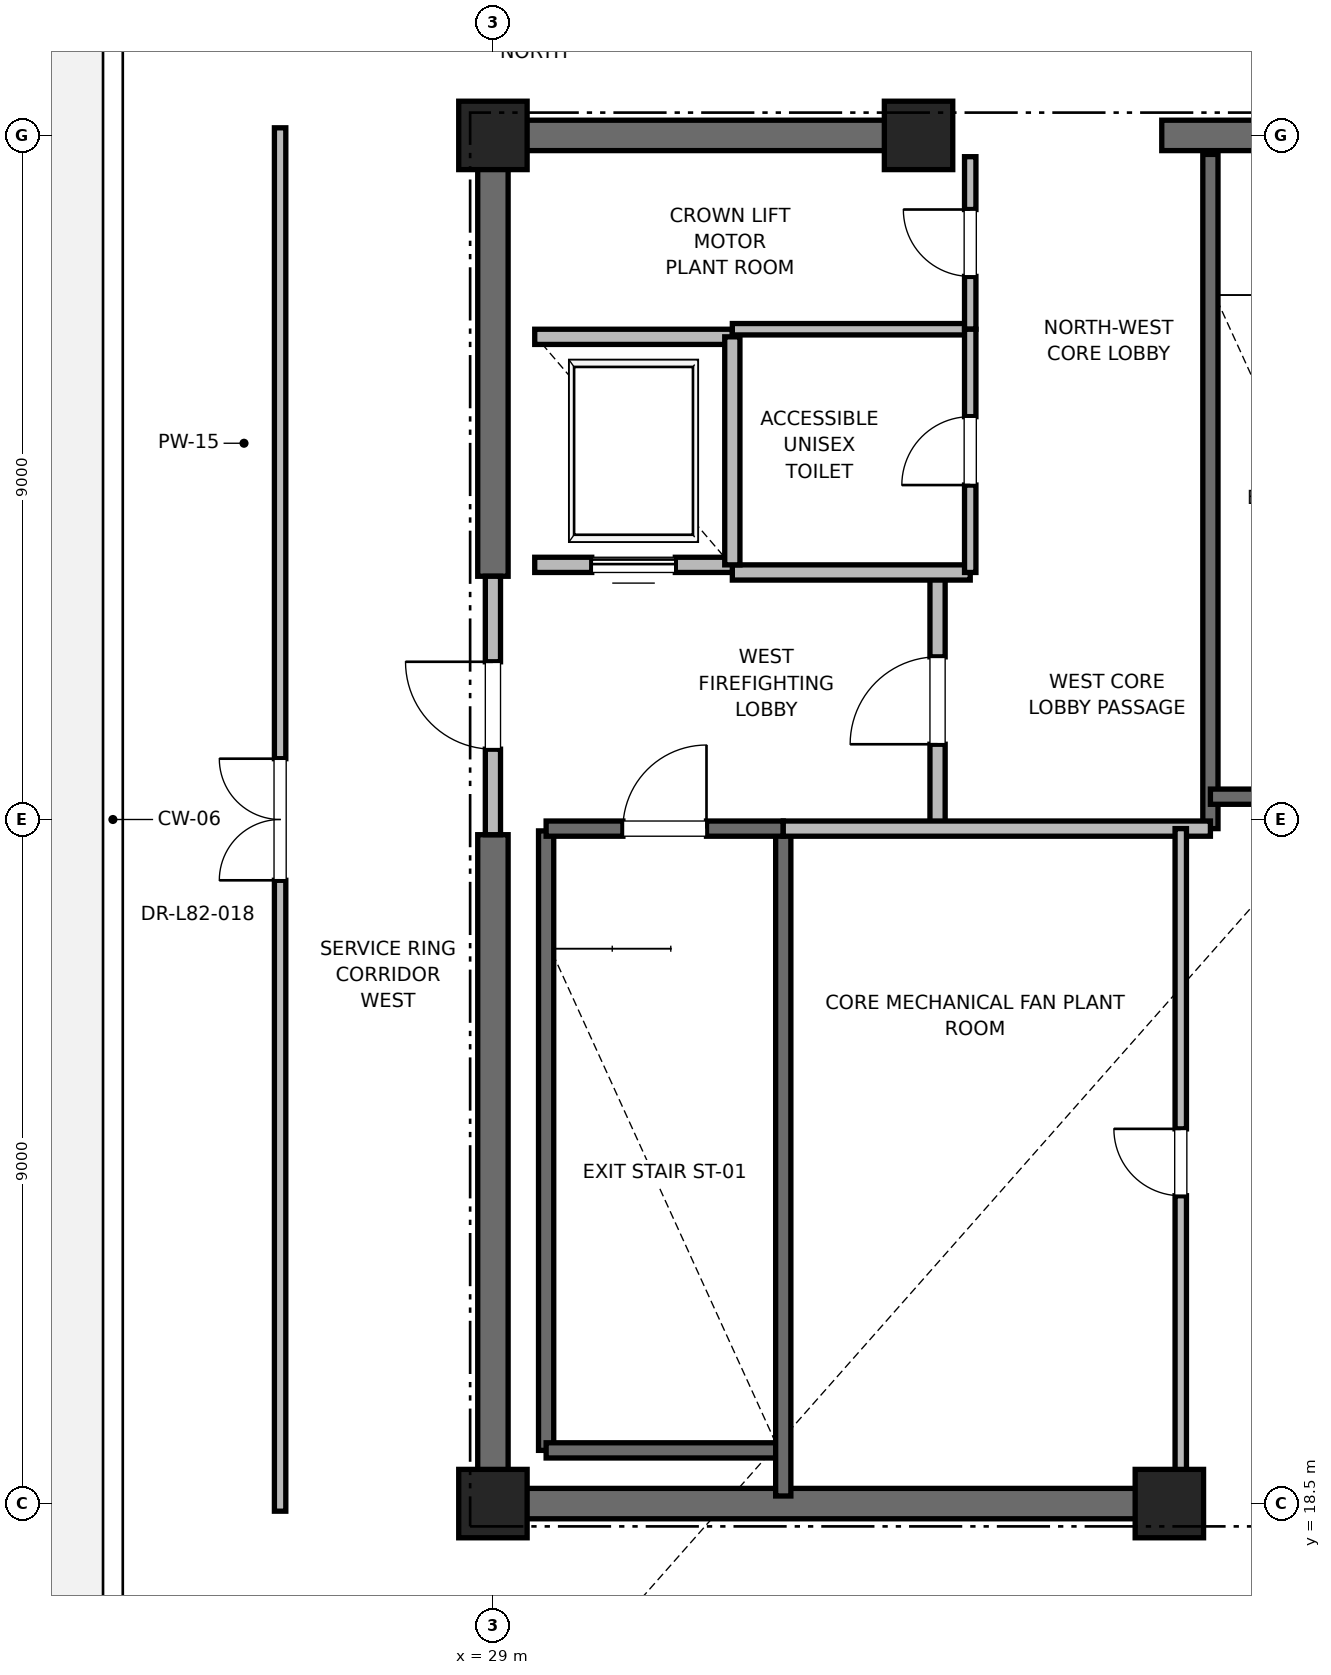
"""IFC4 building model, lengths in metres.
Left out: names, types, materials, properties, quantities, classifications, styles, units other than length and angle.
Written with IfcOpenShell. Run it as: python <this file> out.ifc"""

import sys

from ifc_helpers import new_model, si_unit, direction, frame, frame_2d, origin, origin_2d, place, context, subcontext, project, spatial, rectangle, extrude, element, fill, save


model = new_model("IFC4")
c1 = context("Model", 3, precision=1e-05, world=origin(), true_north=direction((0.0, 1.0)))
c2 = subcontext(c1, "Body", "Model", "MODEL_VIEW")
j1 = project(units=[si_unit("LENGTHUNIT", "METRE"), si_unit("PLANEANGLEUNIT", "RADIAN")], contexts=[c1])
p1 = place(None, origin())
s1 = spatial("IfcSite", under=j1, at=p1, CompositionType="ELEMENT")
p2 = place(p1, origin())
s2 = spatial("IfcBuilding", under=s1, at=p2, CompositionType="ELEMENT")
p3 = place(p2, frame((0.0, 0.0, 354.3)))
s3 = spatial("IfcBuildingStorey", under=s2, at=p3, CompositionType="ELEMENT", Elevation=354.3)
for number, where, z_axis, x_axis in (
    (1, (29.0, 18.5, 0.0), (0.0, 0.0, 1.0), (1.0, 0.0, 0.0)),
    (2, (29.0, 36.5, 0.0), (0.0, 0.0, 1.0), (1.0, 0.0, 0.0)),
    (3, (37.9, 18.5, 0.0), (0.0, 0.0, 1.0), (1.0, 0.0, 0.0)),
    (4, (34.6, 36.5, 0.0), (0.0, 0.0, 1.0), (1.0, 0.0, 0.0)),
):
    element("IfcColumn", number, at=place(p3, frame(where, z_axis=z_axis, x_axis=x_axis)), inside=s3, PredefinedType="PILASTER", context=c2, shape_type="SweptSolid", body=[
        extrude(rectangle(XDim=0.9, YDim=0.9, at=origin_2d()), origin(), (0.0, 0.0, 1.0), 5.5),
    ])
p4 = place(p3, frame((29.0, 18.5, 0.0), z_axis=(0.0, 0.0, 1.0), x_axis=(1.0, 0.0, 0.0)))
e5 = element("IfcWall", 5, at=p4, inside=s3, PredefinedType="SHEAR", context=c2, shape_type="SweptSolid", body=[
    extrude(rectangle(XDim=9.2, YDim=0.4, at=frame_2d((4.6, 0.0))), origin(), (0.0, 0.0, 1.0), 5.24),
])
p5 = place(p3, frame((29.0, 36.5, 0.0), z_axis=(0.0, 0.0, 1.0), x_axis=(1.0, 0.0, 0.0)))
e6 = element("IfcWall", 6, at=p5, inside=s3, PredefinedType="SHEAR", context=c2, shape_type="SweptSolid", body=[
    extrude(rectangle(XDim=5.8, YDim=0.4, at=frame_2d((2.9, 0.0))), origin(), (0.0, 0.0, 1.0), 5.24),
])
p6 = place(p3, frame((37.8, 36.5, 0.0), z_axis=(0.0, 0.0, 1.0), x_axis=(1.0, 0.0, 0.0)))
e7 = element("IfcWall", 7, at=p6, inside=s3, PredefinedType="SHEAR", context=c2, shape_type="SweptSolid", body=[
    extrude(rectangle(XDim=4.4, YDim=0.4, at=frame_2d((2.2, 0.0))), origin(), (0.0, 0.0, 1.0), 5.24),
])
p7 = place(p6, frame((1.65, 0.0, 0.0)))
e8 = element("IfcOpeningElement", 8, at=p7, cuts=e7, PredefinedType="OPENING", context=c2, shape_type="SweptSolid", body=[
    extrude(rectangle(XDim=1.1, YDim=2.15, at=frame_2d((0.55, 1.075))), frame((0.0, 0.2, 0.0), z_axis=(0.0, -1.0, 0.0), x_axis=(1.0, 0.0, 0.0)), (0.0, 0.0, 1.0), 0.4),
])
p8 = place(p3, frame((29.0, 18.5, 0.0), z_axis=(0.0, 0.0, 1.0), x_axis=(0.0, 1.0, 0.0)))
e9 = element("IfcWall", 9, at=p8, inside=s3, PredefinedType="SHEAR", context=c2, shape_type="SweptSolid", body=[
    extrude(rectangle(XDim=8.8, YDim=0.4, at=frame_2d((4.4, 0.0))), origin(), (0.0, 0.0, 1.0), 5.24),
])
p9 = place(p3, frame((29.0, 30.7, 0.0), z_axis=(0.0, 0.0, 1.0), x_axis=(0.0, 1.0, 0.0)))
e10 = element("IfcWall", 10, at=p9, inside=s3, PredefinedType="SHEAR", context=c2, shape_type="SweptSolid", body=[
    extrude(rectangle(XDim=5.8, YDim=0.4, at=frame_2d((2.9, 0.0))), origin(), (0.0, 0.0, 1.0), 5.24),
])
p10 = place(p3, frame((29.7, 19.2, 0.0), z_axis=(0.0, 0.0, 1.0), x_axis=(0.0, 1.0, 0.0)))
e11 = element("IfcWall", 11, at=p10, inside=s3, PredefinedType="SOLIDWALL", context=c2, shape_type="SweptSolid", body=[
    extrude(rectangle(XDim=8.15, YDim=0.2, at=frame_2d((4.075, 0.0))), origin(), (0.0, 0.0, 1.0), 5.24),
])
p11 = place(p3, frame((29.7, 19.2, 0.0), z_axis=(0.0, 0.0, 1.0), x_axis=(1.0, 0.0, 0.0)))
e12 = element("IfcWall", 12, at=p11, inside=s3, PredefinedType="SOLIDWALL", context=c2, shape_type="SweptSolid", body=[
    extrude(rectangle(XDim=3.12, YDim=0.2, at=frame_2d((1.56, 0.0))), origin(), (0.0, 0.0, 1.0), 5.24),
])
p12 = place(p3, frame((32.82, 18.6, 0.0), z_axis=(0.0, 0.0, 1.0), x_axis=(0.0, 1.0, 0.0)))
e13 = element("IfcWall", 13, at=p12, inside=s3, PredefinedType="SOLIDWALL", context=c2, shape_type="SweptSolid", body=[
    extrude(rectangle(XDim=8.78, YDim=0.2, at=frame_2d((4.39, 0.0))), origin(), (0.0, 0.0, 1.0), 5.24),
])
p13 = place(p3, frame((29.7, 27.38, 0.0), z_axis=(0.0, 0.0, 1.0), x_axis=(1.0, 0.0, 0.0)))
e14 = element("IfcWall", 14, at=p13, inside=s3, PredefinedType="SOLIDWALL", context=c2, shape_type="SweptSolid", body=[
    extrude(rectangle(XDim=3.12, YDim=0.2, at=frame_2d((1.56, 0.0))), origin(), (0.0, 0.0, 1.0), 5.24),
])
p14 = place(p13, frame((1.01, 0.0, 0.0)))
e15 = element("IfcOpeningElement", 15, at=p14, cuts=e14, PredefinedType="OPENING", context=c2, shape_type="SweptSolid", body=[
    extrude(rectangle(XDim=1.1, YDim=2.15, at=frame_2d((0.55, 1.075))), frame((0.0, 0.1, 0.0), z_axis=(0.0, -1.0, 0.0), x_axis=(1.0, 0.0, 0.0)), (0.0, 0.0, 1.0), 0.2),
])
p15 = place(p3, frame((38.44, 27.38, 0.0), z_axis=(0.0, 0.0, 1.0), x_axis=(0.0, 1.0, 0.0)))
e16 = element("IfcWall", 16, at=p15, inside=s3, PredefinedType="SOLIDWALL", context=c2, shape_type="SweptSolid", body=[
    extrude(rectangle(XDim=8.87, YDim=0.2, at=frame_2d((4.435, 0.0))), origin(), (0.0, 0.0, 1.0), 5.24),
])
p16 = place(p3, frame((38.44, 27.8, 0.0), z_axis=(0.0, 0.0, 1.0), x_axis=(1.0, 0.0, 0.0)))
e17 = element("IfcWall", 17, at=p16, inside=s3, PredefinedType="SOLIDWALL", context=c2, shape_type="SweptSolid", body=[
    extrude(rectangle(XDim=3.32, YDim=0.2, at=frame_2d((1.66, 0.0))), origin(), (0.0, 0.0, 1.0), 5.24),
])
p17 = place(p3, frame((34.85, 27.38, 0.0), z_axis=(0.0, 0.0, 1.0), x_axis=(0.0, 1.0, 0.0)))
e18 = element("IfcWall", 18, at=p17, inside=s3, PredefinedType="PARTITIONING", context=c2, shape_type="SweptSolid", body=[
    extrude(rectangle(XDim=3.37, YDim=0.2, at=frame_2d((1.685, 0.0))), origin(), (0.0, 0.0, 1.0), 5.24),
])
p18 = place(p17, frame((1.11, 0.0, 0.0)))
e19 = element("IfcOpeningElement", 19, at=p18, cuts=e18, PredefinedType="OPENING", context=c2, shape_type="SweptSolid", body=[
    extrude(rectangle(XDim=1.15, YDim=2.2, at=frame_2d((0.575, 1.1))), frame((0.0, 0.1, 0.0), z_axis=(0.0, -1.0, 0.0), x_axis=(1.0, 0.0, 0.0)), (0.0, 0.0, 1.0), 0.2),
])
p19 = place(p3, frame((29.0, 27.3, 0.0), z_axis=(0.0, 0.0, 1.0), x_axis=(0.0, 1.0, 0.0)))
e20 = element("IfcWall", 20, at=p19, inside=s3, PredefinedType="PARTITIONING", context=c2, shape_type="SweptSolid", body=[
    extrude(rectangle(XDim=3.4, YDim=0.2, at=frame_2d((1.7, 0.0))), origin(), (0.0, 0.0, 1.0), 4.32),
])
p20 = place(p19, frame((1.125, 0.0, 0.0)))
e21 = element("IfcOpeningElement", 21, at=p20, cuts=e20, PredefinedType="OPENING", context=c2, shape_type="SweptSolid", body=[
    extrude(rectangle(XDim=1.15, YDim=2.2, at=frame_2d((0.575, 1.1))), frame((0.0, 0.1, 0.0), z_axis=(0.0, -1.0, 0.0), x_axis=(1.0, 0.0, 0.0)), (0.0, 0.0, 1.0), 0.2),
])
p21 = place(p3, frame((32.82, 27.38, 0.0), z_axis=(0.0, 0.0, 1.0), x_axis=(1.0, 0.0, 0.0)))
e22 = element("IfcWall", 22, at=p21, inside=s3, PredefinedType="PARTITIONING", context=c2, shape_type="SweptSolid", body=[
    extrude(rectangle(XDim=5.62, YDim=0.2, at=frame_2d((2.81, 0.0))), origin(), (0.0, 0.0, 1.0), 5.24),
])
p22 = place(p3, frame((32.15, 30.75, 0.0), z_axis=(0.0, 0.0, 1.0), x_axis=(1.0, 0.0, 0.0)))
e23 = element("IfcWall", 23, at=p22, inside=s3, PredefinedType="PARTITIONING", context=c2, shape_type="SweptSolid", body=[
    extrude(rectangle(XDim=3.13, YDim=0.2, at=frame_2d((1.565, 0.0))), origin(), (0.0, 0.0, 1.0), 5.24),
])
p23 = place(p3, frame((29.55, 30.85, 0.0), z_axis=(0.0, 0.0, 1.0), x_axis=(1.0, 0.0, 0.0)))
e24 = element("IfcWall", 24, at=p23, inside=s3, PredefinedType="SOLIDWALL", context=c2, shape_type="SweptSolid", body=[
    extrude(rectangle(XDim=2.6, YDim=0.2, at=frame_2d((1.3, 0.0))), origin(), (0.0, 0.0, 1.0), 4.32),
])
p24 = place(p23, frame((0.75, 0.0, 0.0)))
e25 = element("IfcOpeningElement", 25, at=p24, cuts=e24, PredefinedType="OPENING", context=c2, shape_type="SweptSolid", body=[
    extrude(rectangle(XDim=1.1, YDim=2.2, at=frame_2d((0.55, 1.1))), frame((0.0, 0.1, 0.0), z_axis=(0.0, -1.0, 0.0), x_axis=(1.0, 0.0, 0.0)), (0.0, 0.0, 1.0), 0.2),
])
p25 = place(p3, frame((32.15, 33.85, 0.0), z_axis=(0.0, 0.0, 1.0), x_axis=(-1.0, 0.0, 0.0)))
e26 = element("IfcWall", 26, at=p25, inside=s3, PredefinedType="SOLIDWALL", context=c2, shape_type="SweptSolid", body=[
    extrude(rectangle(XDim=2.6, YDim=0.2, at=frame_2d((1.3, 0.0))), origin(), (0.0, 0.0, 1.0), 5.24),
])
p26 = place(p3, frame((32.15, 30.85, 0.0), z_axis=(0.0, 0.0, 1.0), x_axis=(0.0, 1.0, 0.0)))
e27 = element("IfcWall", 27, at=p26, inside=s3, PredefinedType="SOLIDWALL", context=c2, shape_type="SweptSolid", body=[
    extrude(rectangle(XDim=3.0, YDim=0.2, at=frame_2d((1.5, 0.0))), origin(), (0.0, 0.0, 1.0), 5.24),
])
p27 = place(p3, frame((32.15, 33.95, 0.0), z_axis=(0.0, 0.0, 1.0), x_axis=(1.0, 0.0, 0.0)))
e28 = element("IfcWall", 28, at=p27, inside=s3, PredefinedType="PARTITIONING", context=c2, shape_type="SweptSolid", body=[
    extrude(rectangle(XDim=3.13, YDim=0.15, at=frame_2d((1.565, 0.0))), origin(), (0.0, 0.0, 1.0), 2.85),
])
p28 = place(p3, frame((35.28, 33.95, 0.0), z_axis=(0.0, 0.0, 1.0), x_axis=(0.0, 1.0, 0.0)))
e29 = element("IfcWall", 29, at=p28, inside=s3, PredefinedType="PARTITIONING", context=c2, shape_type="SweptSolid", body=[
    extrude(rectangle(XDim=2.27, YDim=0.15, at=frame_2d((1.135, 0.0))), origin(), (0.0, 0.0, 1.0), 2.85),
])
p29 = place(p28, frame((0.695, 0.0, 0.0)))
e30 = element("IfcOpeningElement", 30, at=p29, cuts=e29, PredefinedType="OPENING", context=c2, shape_type="SweptSolid", body=[
    extrude(rectangle(XDim=0.88, YDim=2.1, at=frame_2d((0.44, 1.05))), frame((0.0, 0.075, 0.0), z_axis=(0.0, -1.0, 0.0), x_axis=(1.0, 0.0, 0.0)), (0.0, 0.0, 1.0), 0.15),
])
p30 = place(p3, frame((35.28, 30.75, 0.0), z_axis=(0.0, 0.0, 1.0), x_axis=(0.0, 1.0, 0.0)))
e31 = element("IfcWall", 31, at=p30, inside=s3, PredefinedType="PARTITIONING", context=c2, shape_type="SweptSolid", body=[
    extrude(rectangle(XDim=3.2, YDim=0.15, at=frame_2d((1.6, 0.0))), origin(), (0.0, 0.0, 1.0), 2.85),
])
p31 = place(p30, frame((1.15, 0.0, 0.0)))
e32 = element("IfcOpeningElement", 32, at=p31, cuts=e31, PredefinedType="OPENING", context=c2, shape_type="SweptSolid", body=[
    extrude(rectangle(XDim=0.9, YDim=2.1, at=frame_2d((0.45, 1.05))), frame((0.0, 0.075, 0.0), z_axis=(0.0, -1.0, 0.0), x_axis=(1.0, 0.0, 0.0)), (0.0, 0.0, 1.0), 0.15),
])
p32 = place(p3, frame((38.05, 18.6, 0.0), z_axis=(0.0, 0.0, 1.0), x_axis=(0.0, 1.0, 0.0)))
e33 = element("IfcWall", 33, at=p32, inside=s3, PredefinedType="PARTITIONING", context=c2, shape_type="SweptSolid", body=[
    extrude(rectangle(XDim=8.78, YDim=0.15, at=frame_2d((4.39, 0.0))), origin(), (0.0, 0.0, 1.0), 2.85),
])
p33 = place(p32, frame((3.95, 0.0, 0.0)))
e34 = element("IfcOpeningElement", 34, at=p33, cuts=e33, PredefinedType="OPENING", context=c2, shape_type="SweptSolid", body=[
    extrude(rectangle(XDim=0.88, YDim=2.1, at=frame_2d((0.44, 1.05))), frame((0.0, 0.075, 0.0), z_axis=(0.0, -1.0, 0.0), x_axis=(1.0, 0.0, 0.0)), (0.0, 0.0, 1.0), 0.15),
])
p34 = place(p3, frame((26.2, 18.4, 0.0), z_axis=(0.0, 0.0, 1.0), x_axis=(0.0, 1.0, 0.0)))
e35 = element("IfcWall", 35, at=p34, inside=s3, PredefinedType="PARTITIONING", context=c2, shape_type="SweptSolid", body=[
    extrude(rectangle(XDim=18.2, YDim=0.15, at=frame_2d((9.1, 0.0))), origin(), (0.0, 0.0, 1.0), 2.85),
])
p35 = place(p34, frame((8.3, 0.0, 0.0)))
e36 = element("IfcOpeningElement", 36, at=p35, cuts=e35, PredefinedType="OPENING", context=c2, shape_type="SweptSolid", body=[
    extrude(rectangle(XDim=1.6, YDim=2.25, at=frame_2d((0.8, 1.125))), frame((0.0, 0.075, 0.0), z_axis=(0.0, -1.0, 0.0), x_axis=(1.0, 0.0, 0.0)), (0.0, 0.0, 1.0), 0.15),
])
p36 = place(p14, origin())
e37 = element("IfcDoor", 37, at=p36, inside=s3, OperationType="SINGLE_SWING_RIGHT", PredefinedType="DOOR", context=c2, shape_type="SweptSolid", body=[
    extrude(rectangle(XDim=1.1, YDim=2.15, at=frame_2d((0.55, 1.075))), frame((0.0, 0.025, 0.0), z_axis=(0.0, -1.0, 0.0), x_axis=(1.0, 0.0, 0.0)), (0.0, 0.0, 1.0), 0.05),
])
fill(e15, e37)
p37 = place(p18, origin())
e38 = element("IfcDoor", 38, at=p37, inside=s3, OperationType="SINGLE_SWING_LEFT", PredefinedType="DOOR", context=c2, shape_type="SweptSolid", body=[
    extrude(rectangle(XDim=1.15, YDim=2.2, at=frame_2d((0.575, 1.1))), frame((0.0, 0.025, 0.0), z_axis=(0.0, -1.0, 0.0), x_axis=(1.0, 0.0, 0.0)), (0.0, 0.0, 1.0), 0.05),
])
fill(e19, e38)
p38 = place(p20, origin())
e39 = element("IfcDoor", 39, at=p38, inside=s3, OperationType="SINGLE_SWING_RIGHT", PredefinedType="DOOR", context=c2, shape_type="SweptSolid", body=[
    extrude(rectangle(XDim=1.15, YDim=2.2, at=frame_2d((0.575, 1.1))), frame((0.0, 0.025, 0.0), z_axis=(0.0, -1.0, 0.0), x_axis=(1.0, 0.0, 0.0)), (0.0, 0.0, 1.0), 0.05),
])
fill(e21, e39)
p39 = place(p24, origin())
e40 = element("IfcDoor", 40, at=p39, inside=s3, OperationType="SLIDING_TO_RIGHT", PredefinedType="DOOR", context=c2, shape_type="SweptSolid", body=[
    extrude(rectangle(XDim=1.1, YDim=2.2, at=frame_2d((0.55, 1.1))), frame((0.0, 0.025, 0.0), z_axis=(0.0, -1.0, 0.0), x_axis=(1.0, 0.0, 0.0)), (0.0, 0.0, 1.0), 0.05),
])
fill(e25, e40)
p40 = place(p29, origin())
e41 = element("IfcDoor", 41, at=p40, inside=s3, OperationType="SINGLE_SWING_RIGHT", PredefinedType="DOOR", context=c2, shape_type="SweptSolid", body=[
    extrude(rectangle(XDim=0.88, YDim=2.1, at=frame_2d((0.44, 1.05))), frame((0.0, 0.025, 0.0), z_axis=(0.0, -1.0, 0.0), x_axis=(1.0, 0.0, 0.0)), (0.0, 0.0, 1.0), 0.05),
])
fill(e30, e41)
p41 = place(p31, origin())
e42 = element("IfcDoor", 42, at=p41, inside=s3, OperationType="SINGLE_SWING_LEFT", PredefinedType="DOOR", context=c2, shape_type="SweptSolid", body=[
    extrude(rectangle(XDim=0.9, YDim=2.1, at=frame_2d((0.45, 1.05))), frame((0.0, 0.025, 0.0), z_axis=(0.0, -1.0, 0.0), x_axis=(1.0, 0.0, 0.0)), (0.0, 0.0, 1.0), 0.05),
])
fill(e32, e42)
p42 = place(p33, origin())
e43 = element("IfcDoor", 43, at=p42, inside=s3, OperationType="SINGLE_SWING_RIGHT", PredefinedType="DOOR", context=c2, shape_type="SweptSolid", body=[
    extrude(rectangle(XDim=0.88, YDim=2.1, at=frame_2d((0.44, 1.05))), frame((0.0, 0.025, 0.0), z_axis=(0.0, -1.0, 0.0), x_axis=(1.0, 0.0, 0.0)), (0.0, 0.0, 1.0), 0.05),
])
fill(e34, e43)
p43 = place(p35, origin())
e44 = element("IfcDoor", 44, at=p43, inside=s3, OperationType="DOUBLE_DOOR_SINGLE_SWING", PredefinedType="DOOR", context=c2, shape_type="SweptSolid", body=[
    extrude(rectangle(XDim=1.6, YDim=2.25, at=frame_2d((0.8, 1.125))), frame((0.0, 0.025, 0.0), z_axis=(0.0, -1.0, 0.0), x_axis=(1.0, 0.0, 0.0)), (0.0, 0.0, 1.0), 0.05),
])
fill(e36, e44)
save(model, sys.argv[1])
